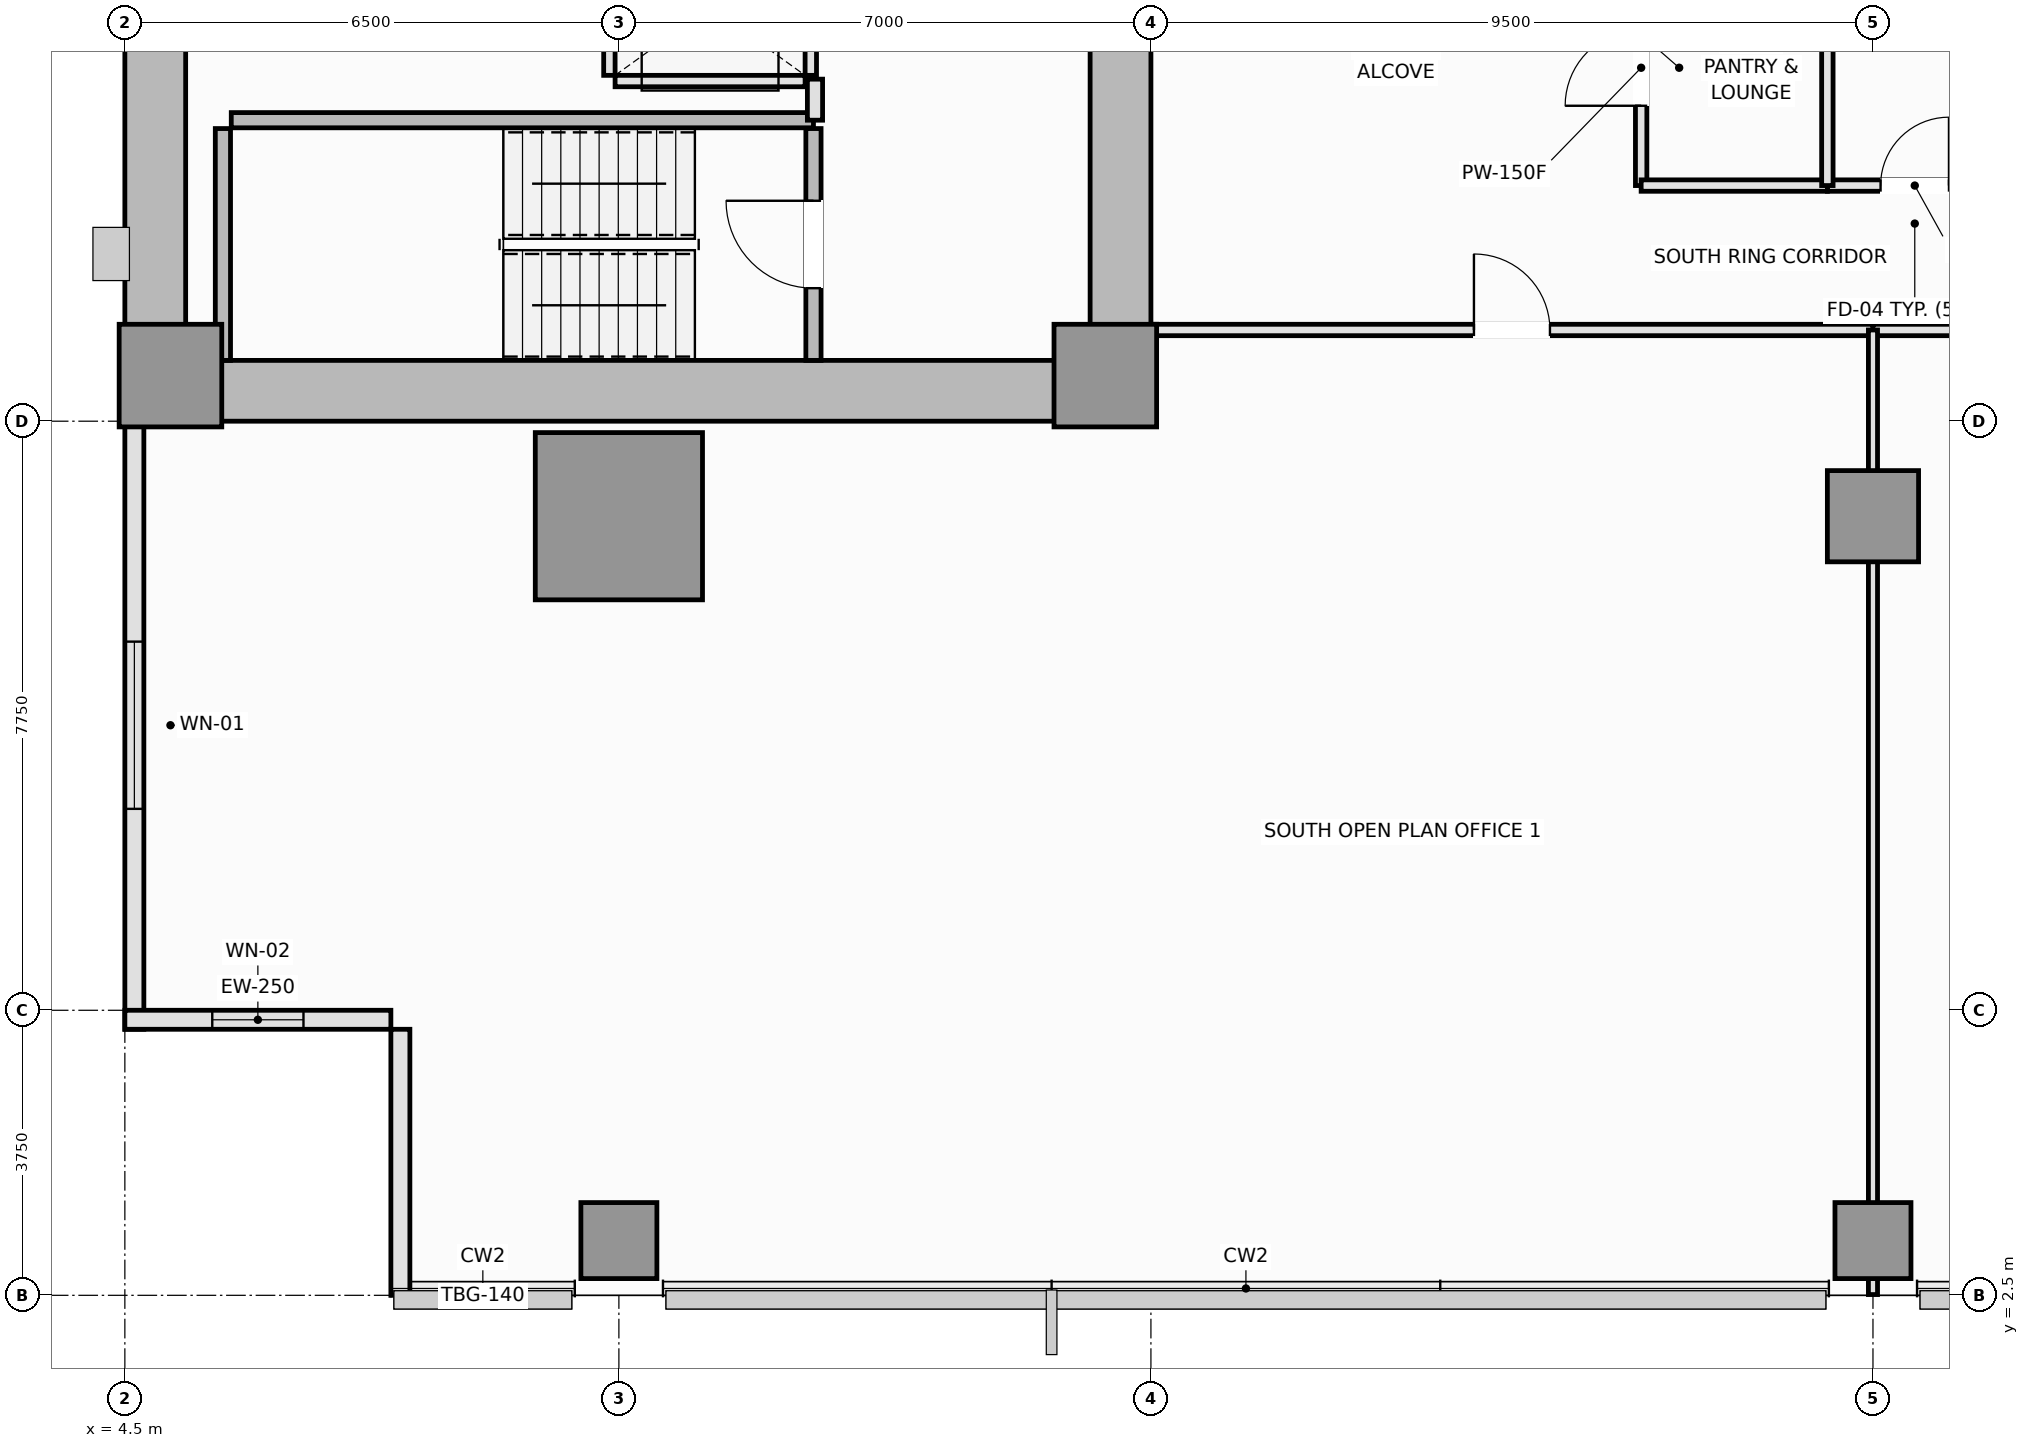
"""IFC4 building model, lengths in metres.
Left out: names, types, materials, properties, quantities, classifications, styles, units other than length and angle.
Written with IfcOpenShell. Run it as: python <this file> out.ifc"""

import sys

from ifc_helpers import new_model, si_unit, direction, frame, frame_2d, origin, origin_2d, place, context, subcontext, project, spatial, rectangle, extrude, element, fill, save


model = new_model("IFC4")
c1 = context("Model", 3, precision=1e-05, world=origin(), true_north=direction((0.0, 1.0)))
c2 = subcontext(c1, "Body", "Model", "MODEL_VIEW")
j1 = project(units=[si_unit("LENGTHUNIT", "METRE"), si_unit("PLANEANGLEUNIT", "RADIAN")], contexts=[c1])
p1 = place(None, origin())
s1 = spatial("IfcSite", under=j1, at=p1, CompositionType="ELEMENT")
p2 = place(p1, origin())
s2 = spatial("IfcBuilding", under=s1, at=p2, CompositionType="ELEMENT")
p3 = place(p2, frame((0.0, 0.0, 36.25)))
s3 = spatial("IfcBuildingStorey", under=s2, at=p3, CompositionType="ELEMENT", Elevation=36.25)
p4 = place(p3, frame((4.5, 14.4, 0.0), z_axis=(0.0, 0.0, 1.0), x_axis=(1.0, 0.0, 0.0)))
e1 = element("IfcWall", 1, at=p4, inside=s3, PredefinedType="SHEAR", context=c2, shape_type="SweptSolid", body=[
    extrude(rectangle(XDim=13.5, YDim=0.8, at=frame_2d((6.75, 0.0))), origin(), (0.0, 0.0, 1.0), 3.55),
])
p5 = place(p3, frame((4.9, 14.8, 0.0), z_axis=(0.0, 0.0, 1.0), x_axis=(0.0, 1.0, 0.0)))
e2 = element("IfcWall", 2, at=p5, inside=s3, PredefinedType="SHEAR", context=c2, shape_type="SweptSolid", body=[
    extrude(rectangle(XDim=20.9, YDim=0.8, at=frame_2d((10.45, 0.0))), origin(), (0.0, 0.0, 1.0), 3.55),
])
p6 = place(p3, frame((17.6, 14.8, 0.0), z_axis=(0.0, 0.0, 1.0), x_axis=(0.0, 1.0, 0.0)))
e3 = element("IfcWall", 3, at=p6, inside=s3, PredefinedType="SHEAR", context=c2, shape_type="SweptSolid", body=[
    extrude(rectangle(XDim=8.65, YDim=0.8, at=frame_2d((4.325, 0.0))), origin(), (0.0, 0.0, 1.0), 3.55),
])
p7 = place(p6, frame((4.1, 0.0, 0.0)))
e4 = element("IfcOpeningElement", 4, at=p7, cuts=e3, PredefinedType="OPENING", context=c2, shape_type="SweptSolid", body=[
    extrude(rectangle(XDim=1.1, YDim=2.15, at=frame_2d((0.55, 1.075))), frame((0.0, 0.41, 0.0), z_axis=(0.0, -1.0, 0.0), x_axis=(1.0, 0.0, 0.0)), (0.0, 0.0, 1.0), 0.82),
])
for number, where, z_axis, x_axis in (
    (5, (5.1, 14.6, 0.0), (0.0, 0.0, 1.0), (1.0, 0.0, 0.0)),
    (6, (17.4, 14.6, 0.0), (0.0, 0.0, 1.0), (1.0, 0.0, 0.0)),
):
    element("IfcColumn", number, at=place(p3, frame(where, z_axis=z_axis, x_axis=x_axis)), inside=s3, PredefinedType="PILASTER", context=c2, shape_type="SweptSolid", body=[
        extrude(rectangle(XDim=1.35, YDim=1.35, at=origin_2d()), origin(), (0.0, 0.0, 1.0), 3.55),
    ])
p8 = place(p3, frame((11.0, 12.75, 0.0), z_axis=(0.0, 0.0, 1.0), x_axis=(1.0, 0.0, 0.0)))
e7 = element("IfcColumn", 7, at=p8, inside=s3, PredefinedType="COLUMN", context=c2, shape_type="SweptSolid", body=[
    extrude(rectangle(XDim=2.2, YDim=2.2, at=origin_2d()), origin(), (0.0, 0.0, 1.0), 3.55),
])
p9 = place(p3, frame((27.5, 12.75, 0.0), z_axis=(0.0, 0.0, 1.0), x_axis=(1.0, 0.0, 0.0)))
e8 = element("IfcColumn", 8, at=p9, inside=s3, PredefinedType="COLUMN", context=c2, shape_type="SweptSolid", body=[
    extrude(rectangle(XDim=1.2, YDim=1.2, at=origin_2d()), origin(), (0.0, 0.0, 1.0), 3.55),
])
for number, where, z_axis, x_axis in (
    (9, (11.0, 3.22, 0.0), (0.0, 0.0, 1.0), (1.0, 0.0, 0.0)),
    (10, (27.5, 3.22, 0.0), (0.0, 0.0, 1.0), (1.0, 0.0, 0.0)),
):
    element("IfcColumn", number, at=place(p3, frame(where, z_axis=z_axis, x_axis=x_axis)), inside=s3, PredefinedType="COLUMN", context=c2, shape_type="SweptSolid", body=[
        extrude(rectangle(XDim=1.0, YDim=1.0, at=origin_2d()), origin(), (0.0, 0.0, 1.0), 3.55),
    ])
p10 = place(p3, frame((4.625, 14.0, 0.0), z_axis=(0.0, 0.0, 1.0), x_axis=(0.0, -1.0, 0.0)))
e11 = element("IfcWall", 11, at=p10, inside=s3, PredefinedType="SOLIDWALL", context=c2, shape_type="SweptSolid", body=[
    extrude(rectangle(XDim=8.0, YDim=0.25, at=frame_2d((4.0, 0.0))), origin(), (0.0, 0.0, 1.0), 3.37),
])
p11 = place(p10, frame((2.9, 0.0, 0.9)))
e12 = element("IfcOpeningElement", 12, at=p11, cuts=e11, PredefinedType="OPENING", context=c2, shape_type="SweptSolid", body=[
    extrude(rectangle(XDim=2.2, YDim=1.8, at=frame_2d((1.1, 0.9))), frame((0.0, 0.135, 0.0), z_axis=(0.0, -1.0, 0.0), x_axis=(1.0, 0.0, 0.0)), (0.0, 0.0, 1.0), 0.27),
])
p12 = place(p3, frame((4.5, 6.125, 0.0), z_axis=(0.0, 0.0, 1.0), x_axis=(1.0, 0.0, 0.0)))
e13 = element("IfcWall", 13, at=p12, inside=s3, PredefinedType="SOLIDWALL", context=c2, shape_type="SweptSolid", body=[
    extrude(rectangle(XDim=3.5, YDim=0.25, at=frame_2d((1.75, 0.0))), origin(), (0.0, 0.0, 1.0), 3.37),
])
p13 = place(p12, frame((1.15, 0.0, 0.9)))
e14 = element("IfcOpeningElement", 14, at=p13, cuts=e13, PredefinedType="OPENING", context=c2, shape_type="SweptSolid", body=[
    extrude(rectangle(XDim=1.2, YDim=1.8, at=frame_2d((0.6, 0.9))), frame((0.0, 0.135, 0.0), z_axis=(0.0, -1.0, 0.0), x_axis=(1.0, 0.0, 0.0)), (0.0, 0.0, 1.0), 0.27),
])
p14 = place(p3, frame((8.125, 6.0, 0.0), z_axis=(0.0, 0.0, 1.0), x_axis=(0.0, -1.0, 0.0)))
e15 = element("IfcWall", 15, at=p14, inside=s3, PredefinedType="SOLIDWALL", context=c2, shape_type="SweptSolid", body=[
    extrude(rectangle(XDim=3.5, YDim=0.25, at=frame_2d((1.75, 0.0))), origin(), (0.0, 0.0, 1.0), 3.37),
])
p15 = place(p3, frame((5.79, 14.8, 0.0), z_axis=(0.0, 0.0, 1.0), x_axis=(0.0, 1.0, 0.0)))
e16 = element("IfcWall", 16, at=p15, inside=s3, PredefinedType="SOLIDWALL", context=c2, shape_type="SweptSolid", body=[
    extrude(rectangle(XDim=3.05, YDim=0.2, at=frame_2d((1.525, 0.0))), origin(), (0.0, 0.0, 1.0), 3.55),
])
p16 = place(p3, frame((5.9, 17.96, 0.0), z_axis=(0.0, 0.0, 1.0), x_axis=(1.0, 0.0, 0.0)))
e17 = element("IfcWall", 17, at=p16, inside=s3, PredefinedType="SOLIDWALL", context=c2, shape_type="SweptSolid", body=[
    extrude(rectangle(XDim=7.66, YDim=0.2, at=frame_2d((3.83, 0.0))), origin(), (0.0, 0.0, 1.0), 3.55),
])
p17 = place(p3, frame((13.56, 14.8, 0.0), z_axis=(0.0, 0.0, 1.0), x_axis=(0.0, 1.0, 0.0)))
e18 = element("IfcWall", 18, at=p17, inside=s3, PredefinedType="SOLIDWALL", context=c2, shape_type="SweptSolid", body=[
    extrude(rectangle(XDim=3.05, YDim=0.2, at=frame_2d((1.525, 0.0))), origin(), (0.0, 0.0, 1.0), 3.55),
])
p18 = place(p17, frame((0.95, 0.0, 0.0)))
e19 = element("IfcOpeningElement", 19, at=p18, cuts=e18, PredefinedType="OPENING", context=c2, shape_type="SweptSolid", body=[
    extrude(rectangle(XDim=1.15, YDim=2.15, at=frame_2d((0.575, 1.075))), frame((0.0, 0.11, 0.0), z_axis=(0.0, -1.0, 0.0), x_axis=(1.0, 0.0, 0.0)), (0.0, 0.0, 1.0), 0.22),
])
p19 = place(p3, frame((10.95, 18.475, 0.0), z_axis=(0.0, 0.0, 1.0), x_axis=(1.0, 0.0, 0.0)))
e20 = element("IfcWall", 20, at=p19, inside=s3, PredefinedType="PARTITIONING", context=c2, shape_type="SweptSolid", body=[
    extrude(rectangle(XDim=2.5, YDim=0.15, at=frame_2d((1.25, 0.0))), origin(), (0.0, 0.0, 1.0), 3.37),
])
p20 = place(p3, frame((10.875, 18.55, 0.0), z_axis=(0.0, 0.0, 1.0), x_axis=(0.0, 1.0, 0.0)))
e21 = element("IfcWall", 21, at=p20, inside=s3, PredefinedType="PARTITIONING", context=c2, shape_type="SweptSolid", body=[
    extrude(rectangle(XDim=1.8, YDim=0.15, at=frame_2d((0.9, 0.0))), origin(), (0.0, 0.0, 1.0), 3.37),
])
p21 = place(p3, frame((13.525, 18.55, 0.0), z_axis=(0.0, 0.0, 1.0), x_axis=(0.0, 1.0, 0.0)))
e22 = element("IfcWall", 22, at=p21, inside=s3, PredefinedType="PARTITIONING", context=c2, shape_type="SweptSolid", body=[
    extrude(rectangle(XDim=1.8, YDim=0.15, at=frame_2d((0.9, 0.0))), origin(), (0.0, 0.0, 1.0), 3.37),
])
p22 = place(p21, frame((0.35, 0.0, 0.0)))
e23 = element("IfcOpeningElement", 23, at=p22, cuts=e22, PredefinedType="OPENING", context=c2, shape_type="SweptSolid", body=[
    extrude(rectangle(XDim=1.1, YDim=2.2, at=frame_2d((0.55, 1.1))), frame((0.0, 0.085, 0.0), z_axis=(0.0, -1.0, 0.0), x_axis=(1.0, 0.0, 0.0)), (0.0, 0.0, 1.0), 0.17),
])
p23 = place(p3, frame((13.58, 17.96, 0.0), z_axis=(0.0, 0.0, 1.0), x_axis=(0.0, 1.0, 0.0)))
e24 = element("IfcWall", 24, at=p23, inside=s3, PredefinedType="PARTITIONING", context=c2, shape_type="SweptSolid", body=[
    extrude(rectangle(XDim=0.54, YDim=0.2, at=frame_2d((0.27, 0.0))), origin(), (0.0, 0.0, 1.0), 3.37),
])
p24 = place(p3, frame((24.45, 17.1, 0.0), z_axis=(0.0, 0.0, 1.0), x_axis=(0.0, 1.0, 0.0)))
e25 = element("IfcWall", 25, at=p24, inside=s3, PredefinedType="PARTITIONING", context=c2, shape_type="SweptSolid", body=[
    extrude(rectangle(XDim=3.1, YDim=0.15, at=frame_2d((1.55, 0.0))), origin(), (0.0, 0.0, 1.0), 3.37),
])
p25 = place(p24, frame((1.05, 0.0, 0.0)))
e26 = element("IfcOpeningElement", 26, at=p25, cuts=e25, PredefinedType="OPENING", context=c2, shape_type="SweptSolid", body=[
    extrude(rectangle(XDim=1.0, YDim=2.15, at=frame_2d((0.5, 1.075))), frame((0.0, 0.085, 0.0), z_axis=(0.0, -1.0, 0.0), x_axis=(1.0, 0.0, 0.0)), (0.0, 0.0, 1.0), 0.17),
])
p26 = place(p3, frame((26.9, 17.1, 0.0), z_axis=(0.0, 0.0, 1.0), x_axis=(1.0, 0.0, 0.0)))
e27 = element("IfcWall", 27, at=p26, inside=s3, PredefinedType="PLUMBINGWALL", context=c2, shape_type="SweptSolid", body=[
    extrude(rectangle(XDim=2.3, YDim=0.15, at=frame_2d((1.15, 0.0))), origin(), (0.0, 0.0, 1.0), 3.37),
])
p27 = place(p26, frame((0.7, 0.0, 0.0)))
e28 = element("IfcOpeningElement", 28, at=p27, cuts=e27, PredefinedType="OPENING", context=c2, shape_type="SweptSolid", body=[
    extrude(rectangle(XDim=0.9, YDim=2.1, at=frame_2d((0.45, 1.05))), frame((0.0, 0.085, 0.0), z_axis=(0.0, -1.0, 0.0), x_axis=(1.0, 0.0, 0.0)), (0.0, 0.0, 1.0), 0.17),
])
p28 = place(p3, frame((24.45, 17.1, 0.0), z_axis=(0.0, 0.0, 1.0), x_axis=(1.0, 0.0, 0.0)))
e29 = element("IfcWall", 29, at=p28, inside=s3, PredefinedType="PARTITIONING", context=c2, shape_type="SweptSolid", body=[
    extrude(rectangle(XDim=2.45, YDim=0.15, at=frame_2d((1.225, 0.0))), origin(), (0.0, 0.0, 1.0), 3.37),
])
p29 = place(p3, frame((18.0, 15.2, 0.0), z_axis=(0.0, 0.0, 1.0), x_axis=(1.0, 0.0, 0.0)))
e30 = element("IfcWall", 30, at=p29, inside=s3, PredefinedType="PARTITIONING", context=c2, shape_type="SweptSolid", body=[
    extrude(rectangle(XDim=9.5, YDim=0.15, at=frame_2d((4.75, 0.0))), origin(), (0.0, 0.0, 1.0), 3.37),
])
p30 = place(p29, frame((4.25, 0.0, 0.0)))
e31 = element("IfcOpeningElement", 31, at=p30, cuts=e30, PredefinedType="OPENING", context=c2, shape_type="SweptSolid", body=[
    extrude(rectangle(XDim=1.0, YDim=2.15, at=frame_2d((0.5, 1.075))), frame((0.0, 0.085, 0.0), z_axis=(0.0, -1.0, 0.0), x_axis=(1.0, 0.0, 0.0)), (0.0, 0.0, 1.0), 0.17),
])
p31 = place(p3, frame((27.5, 15.2, 0.0), z_axis=(0.0, 0.0, 1.0), x_axis=(1.0, 0.0, 0.0)))
e32 = element("IfcWall", 32, at=p31, inside=s3, PredefinedType="PARTITIONING", context=c2, shape_type="SweptSolid", body=[
    extrude(rectangle(XDim=6.8, YDim=0.15, at=frame_2d((3.4, 0.0))), origin(), (0.0, 0.0, 1.0), 3.37),
])
p32 = place(p31, frame((2.9, 0.0, 0.0)))
e33 = element("IfcOpeningElement", 33, at=p32, cuts=e32, PredefinedType="OPENING", context=c2, shape_type="SweptSolid", body=[
    extrude(rectangle(XDim=1.0, YDim=2.15, at=frame_2d((0.5, 1.075))), frame((0.0, 0.085, 0.0), z_axis=(0.0, -1.0, 0.0), x_axis=(1.0, 0.0, 0.0)), (0.0, 0.0, 1.0), 0.17),
])
p33 = place(p3, frame((26.9, 17.1, 0.0), z_axis=(0.0, 0.0, 1.0), x_axis=(0.0, 1.0, 0.0)))
e34 = element("IfcWall", 34, at=p33, inside=s3, PredefinedType="PLUMBINGWALL", context=c2, shape_type="SweptSolid", body=[
    extrude(rectangle(XDim=3.1, YDim=0.15, at=frame_2d((1.55, 0.0))), origin(), (0.0, 0.0, 1.0), 3.37),
])
p34 = place(p3, frame((27.5, 2.51, 0.0), z_axis=(0.0, 0.0, 1.0), x_axis=(0.0, 1.0, 0.0)))
e35 = element("IfcWall", 35, at=p34, inside=s3, PredefinedType="PARTITIONING", context=c2, shape_type="SweptSolid", body=[
    extrude(rectangle(XDim=12.69, YDim=0.12, at=frame_2d((6.345, 0.0))), origin(), (0.0, 0.0, 1.0), 2.82),
])
p35 = place(p11, origin())
e36 = element("IfcWindow", 36, at=p35, inside=s3, PartitioningType="SINGLE_PANEL", PredefinedType="WINDOW", context=c2, shape_type="SweptSolid", body=[
    extrude(rectangle(XDim=2.2, YDim=1.8, at=frame_2d((1.1, 0.9))), frame((0.0, 0.03, 0.0), z_axis=(0.0, -1.0, 0.0), x_axis=(1.0, 0.0, 0.0)), (0.0, 0.0, 1.0), 0.06),
])
fill(e12, e36)
p36 = place(p13, origin())
e37 = element("IfcWindow", 37, at=p36, inside=s3, PartitioningType="SINGLE_PANEL", PredefinedType="WINDOW", context=c2, shape_type="SweptSolid", body=[
    extrude(rectangle(XDim=1.2, YDim=1.8, at=frame_2d((0.6, 0.9))), frame((0.0, 0.03, 0.0), z_axis=(0.0, -1.0, 0.0), x_axis=(1.0, 0.0, 0.0)), (0.0, 0.0, 1.0), 0.06),
])
fill(e14, e37)
p37 = place(p18, origin())
e38 = element("IfcDoor", 38, at=p37, inside=s3, OperationType="SINGLE_SWING_RIGHT", PredefinedType="DOOR", context=c2, shape_type="SweptSolid", body=[
    extrude(rectangle(XDim=1.15, YDim=2.15, at=frame_2d((0.575, 1.075))), frame((0.0, 0.025, 0.0), z_axis=(0.0, -1.0, 0.0), x_axis=(1.0, 0.0, 0.0)), (0.0, 0.0, 1.0), 0.05),
])
fill(e19, e38)
p38 = place(p25, origin())
e39 = element("IfcDoor", 39, at=p38, inside=s3, OperationType="SINGLE_SWING_LEFT", PredefinedType="DOOR", context=c2, shape_type="SweptSolid", body=[
    extrude(rectangle(XDim=1.0, YDim=2.15, at=frame_2d((0.5, 1.075))), frame((0.0, 0.025, 0.0), z_axis=(0.0, -1.0, 0.0), x_axis=(1.0, 0.0, 0.0)), (0.0, 0.0, 1.0), 0.05),
])
fill(e26, e39)
p39 = place(p27, origin())
e40 = element("IfcDoor", 40, at=p39, inside=s3, OperationType="SINGLE_SWING_RIGHT", PredefinedType="DOOR", context=c2, shape_type="SweptSolid", body=[
    extrude(rectangle(XDim=0.9, YDim=2.1, at=frame_2d((0.45, 1.05))), frame((0.0, 0.025, 0.0), z_axis=(0.0, -1.0, 0.0), x_axis=(1.0, 0.0, 0.0)), (0.0, 0.0, 1.0), 0.05),
])
fill(e28, e40)
p40 = place(p30, origin())
e41 = element("IfcDoor", 41, at=p40, inside=s3, OperationType="SINGLE_SWING_LEFT", PredefinedType="DOOR", context=c2, shape_type="SweptSolid", body=[
    extrude(rectangle(XDim=1.0, YDim=2.15, at=frame_2d((0.5, 1.075))), frame((0.0, 0.025, 0.0), z_axis=(0.0, -1.0, 0.0), x_axis=(1.0, 0.0, 0.0)), (0.0, 0.0, 1.0), 0.05),
])
fill(e31, e41)
save(model, sys.argv[1])
